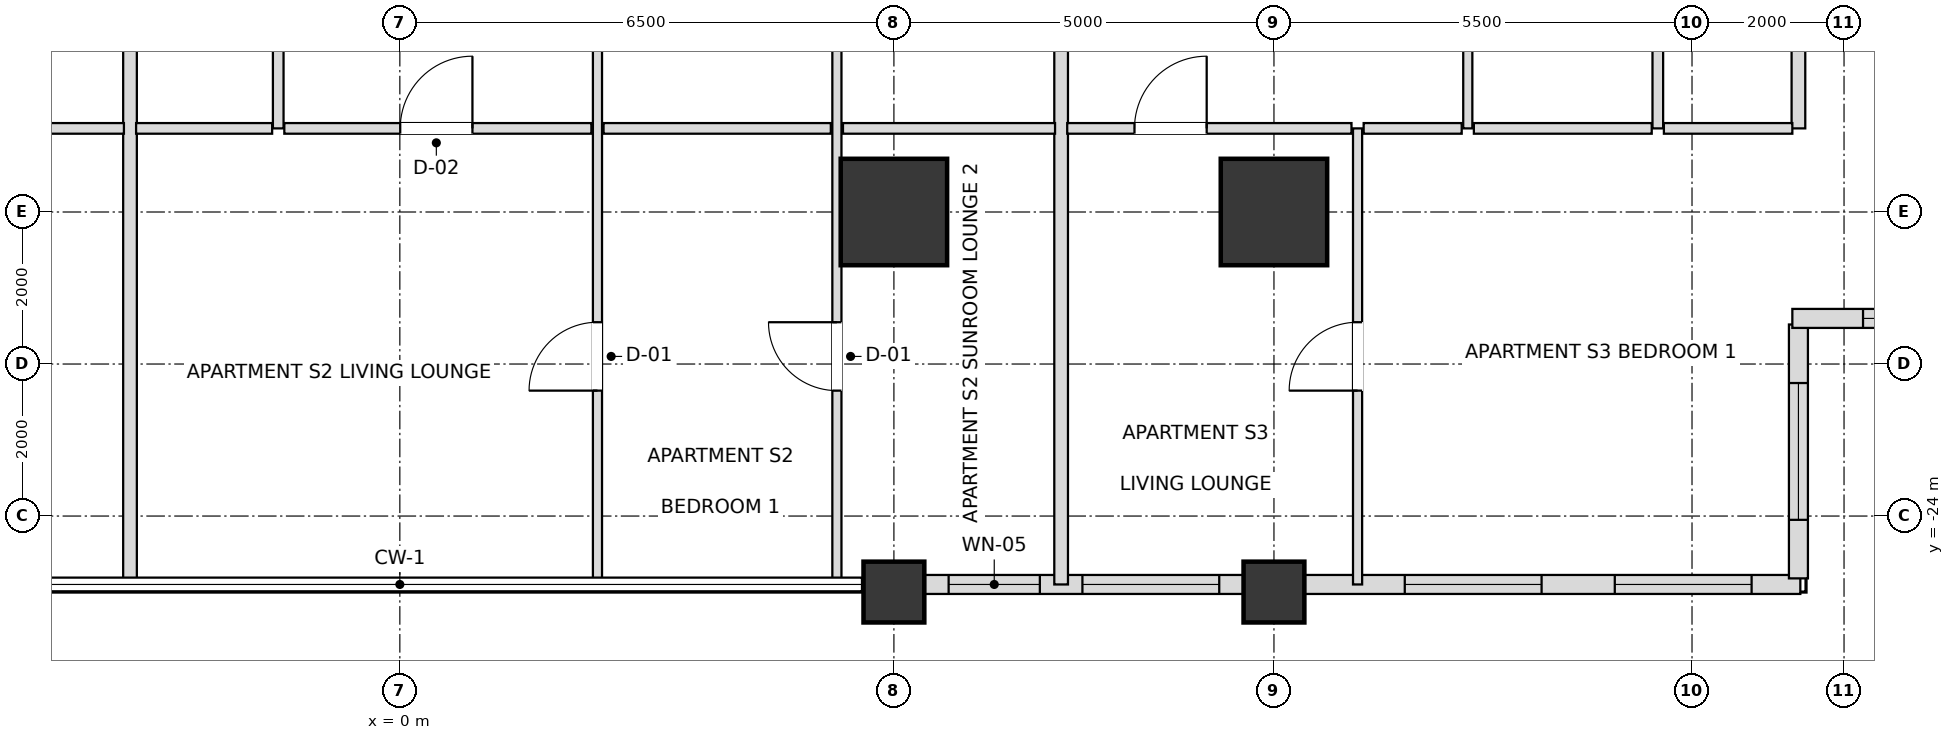
"""IFC4 building model, lengths in metres.
Left out: names, types, materials, properties, quantities, classifications, styles, units other than length and angle.
Written with IfcOpenShell. Run it as: python <this file> out.ifc"""

import sys

from ifc_helpers import new_model, si_unit, direction, frame, frame_2d, origin, origin_2d, place, context, subcontext, project, spatial, rectangle, extrude, element, fill, save


model = new_model("IFC4")
c1 = context("Model", 3, precision=1e-05, world=origin(), true_north=direction((0.0, 1.0)))
c2 = subcontext(c1, "Body", "Model", "MODEL_VIEW")
j1 = project(units=[si_unit("LENGTHUNIT", "METRE"), si_unit("PLANEANGLEUNIT", "RADIAN")], contexts=[c1])
p1 = place(None, origin())
s1 = spatial("IfcSite", under=j1, at=p1, CompositionType="ELEMENT")
p2 = place(p1, origin())
s2 = spatial("IfcBuilding", under=s1, at=p2, CompositionType="ELEMENT")
p3 = place(p2, frame((0.0, 0.0, 46.8)))
s3 = spatial("IfcBuildingStorey", under=s2, at=p3, CompositionType="ELEMENT", Elevation=46.8)
for number, where, z_axis, x_axis in (
    (1, (6.5, -20.0, 0.0), (0.0, 0.0, 1.0), (1.0, 0.0, 0.0)),
    (2, (11.5, -20.0, 0.0), (0.0, 0.0, 1.0), (1.0, 0.0, 0.0)),
):
    element("IfcColumn", number, at=place(p3, frame(where, z_axis=z_axis, x_axis=x_axis)), inside=s3, PredefinedType="USERDEFINED", context=c2, shape_type="SweptSolid", body=[
        extrude(rectangle(XDim=1.4, YDim=1.4, at=origin_2d()), origin(), (0.0, 0.0, 1.0), 3.6),
    ])
for number, where, z_axis, x_axis in (
    (3, (6.5, -25.0, 0.0), (0.0, 0.0, 1.0), (1.0, 0.0, 0.0)),
    (4, (11.5, -25.0, 0.0), (0.0, 0.0, 1.0), (1.0, 0.0, 0.0)),
):
    element("IfcColumn", number, at=place(p3, frame(where, z_axis=z_axis, x_axis=x_axis)), inside=s3, PredefinedType="COLUMN", context=c2, shape_type="SweptSolid", body=[
        extrude(rectangle(XDim=0.8, YDim=0.8, at=origin_2d()), origin(), (0.0, 0.0, 1.0), 3.6),
    ])
p4 = place(p3, frame((6.895, -24.9, 0.0), z_axis=(0.0, 0.0, 1.0), x_axis=(1.0, 0.0, 0.0)))
e5 = element("IfcWall", 5, at=p4, inside=s3, PredefinedType="SOLIDWALL", context=c2, shape_type="SweptSolid", body=[
    extrude(rectangle(XDim=4.21, YDim=0.25, at=frame_2d((2.105, 0.0))), origin(), (0.0, 0.0, 1.0), 2.736),
])
p5 = place(p4, frame((0.325, 0.0, 0.72)))
e6 = element("IfcOpeningElement", 6, at=p5, cuts=e5, PredefinedType="OPENING", context=c2, shape_type="SweptSolid", body=[
    extrude(rectangle(XDim=1.2, YDim=1.68, at=frame_2d((0.6, 0.84))), frame((0.0, 0.135, 0.0), z_axis=(0.0, -1.0, 0.0), x_axis=(1.0, 0.0, 0.0)), (0.0, 0.0, 1.0), 0.27),
])
p6 = place(p4, frame((2.085, 0.0, 0.72)))
e7 = element("IfcOpeningElement", 7, at=p6, cuts=e5, PredefinedType="OPENING", context=c2, shape_type="SweptSolid", body=[
    extrude(rectangle(XDim=1.8, YDim=1.68, at=frame_2d((0.9, 0.84))), frame((0.0, 0.135, 0.0), z_axis=(0.0, -1.0, 0.0), x_axis=(1.0, 0.0, 0.0)), (0.0, 0.0, 1.0), 0.27),
])
p7 = place(p3, frame((11.895, -24.9, 0.0), z_axis=(0.0, 0.0, 1.0), x_axis=(1.0, 0.0, 0.0)))
e8 = element("IfcWall", 8, at=p7, inside=s3, PredefinedType="SOLIDWALL", context=c2, shape_type="SweptSolid", body=[
    extrude(rectangle(XDim=6.53, YDim=0.25, at=frame_2d((3.265, 0.0))), origin(), (0.0, 0.0, 1.0), 2.736),
])
p8 = place(p7, frame((1.326, 0.0, 0.72)))
e9 = element("IfcOpeningElement", 9, at=p8, cuts=e8, PredefinedType="OPENING", context=c2, shape_type="SweptSolid", body=[
    extrude(rectangle(XDim=1.8, YDim=1.68, at=frame_2d((0.9, 0.84))), frame((0.0, 0.135, 0.0), z_axis=(0.0, -1.0, 0.0), x_axis=(1.0, 0.0, 0.0)), (0.0, 0.0, 1.0), 0.27),
])
p9 = place(p7, frame((4.089, 0.0, 0.72)))
e10 = element("IfcOpeningElement", 10, at=p9, cuts=e8, PredefinedType="OPENING", context=c2, shape_type="SweptSolid", body=[
    extrude(rectangle(XDim=1.8, YDim=1.68, at=frame_2d((0.9, 0.84))), frame((0.0, 0.135, 0.0), z_axis=(0.0, -1.0, 0.0), x_axis=(1.0, 0.0, 0.0)), (0.0, 0.0, 1.0), 0.27),
])
p10 = place(p3, frame((18.4, -24.82, 0.0), z_axis=(0.0, 0.0, 1.0), x_axis=(0.0, 1.0, 0.0)))
e11 = element("IfcWall", 11, at=p10, inside=s3, PredefinedType="SOLIDWALL", context=c2, shape_type="SweptSolid", body=[
    extrude(rectangle(XDim=3.34, YDim=0.25, at=frame_2d((1.67, 0.0))), origin(), (0.0, 0.0, 1.0), 2.736),
])
p11 = place(p10, frame((0.77, 0.0, 0.72)))
e12 = element("IfcOpeningElement", 12, at=p11, cuts=e11, PredefinedType="OPENING", context=c2, shape_type="SweptSolid", body=[
    extrude(rectangle(XDim=1.8, YDim=1.68, at=frame_2d((0.9, 0.84))), frame((0.0, 0.135, 0.0), z_axis=(0.0, -1.0, 0.0), x_axis=(1.0, 0.0, 0.0)), (0.0, 0.0, 1.0), 0.27),
])
p12 = place(p3, frame((18.32, -21.4, 0.0), z_axis=(0.0, 0.0, 1.0), x_axis=(1.0, 0.0, 0.0)))
e13 = element("IfcWall", 13, at=p12, inside=s3, PredefinedType="SOLIDWALL", context=c2, shape_type="SweptSolid", body=[
    extrude(rectangle(XDim=3.66, YDim=0.25, at=frame_2d((1.83, 0.0))), origin(), (0.0, 0.0, 1.0), 2.736),
])
p13 = place(p12, frame((0.93, 0.0, 0.72)))
e14 = element("IfcOpeningElement", 14, at=p13, cuts=e13, PredefinedType="OPENING", context=c2, shape_type="SweptSolid", body=[
    extrude(rectangle(XDim=1.8, YDim=1.68, at=frame_2d((0.9, 0.84))), frame((0.0, 0.135, 0.0), z_axis=(0.0, -1.0, 0.0), x_axis=(1.0, 0.0, 0.0)), (0.0, 0.0, 1.0), 0.27),
])
p14 = place(p3, frame((-3.55, -24.9, 0.0), z_axis=(0.0, 0.0, 1.0), x_axis=(0.0, 1.0, 0.0)))
e15 = element("IfcWall", 15, at=p14, inside=s3, PredefinedType="PARTITIONING", context=c2, shape_type="SweptSolid", body=[
    extrude(rectangle(XDim=15.6, YDim=0.18, at=frame_2d((7.8, 0.0))), origin(), (0.0, 0.0, 1.0), 2.816),
])
p15 = place(p3, frame((-1.6, -18.9, 0.0), z_axis=(0.0, 0.0, 1.0), x_axis=(0.0, 1.0, 0.0)))
e16 = element("IfcWall", 16, at=p15, inside=s3, PredefinedType="PARTITIONING", context=c2, shape_type="SweptSolid", body=[
    extrude(rectangle(XDim=9.6, YDim=0.14, at=frame_2d((4.8, 0.0))), origin(), (0.0, 0.0, 1.0), 2.948),
])
p16 = place(p15, frame((4.35, 0.0, 0.0)))
e17 = element("IfcOpeningElement", 17, at=p16, cuts=e16, PredefinedType="OPENING", context=c2, shape_type="SweptSolid", body=[
    extrude(rectangle(XDim=0.9, YDim=2.1, at=frame_2d((0.45, 1.05))), frame((0.0, 0.08, 0.0), z_axis=(0.0, -1.0, 0.0), x_axis=(1.0, 0.0, 0.0)), (0.0, 0.0, 1.0), 0.16),
])
p17 = place(p3, frame((2.6, -24.9, 0.0), z_axis=(0.0, 0.0, 1.0), x_axis=(0.0, 1.0, 0.0)))
e18 = element("IfcWall", 18, at=p17, inside=s3, PredefinedType="PARTITIONING", context=c2, shape_type="SweptSolid", body=[
    extrude(rectangle(XDim=15.6, YDim=0.12, at=frame_2d((7.8, 0.0))), origin(), (0.0, 0.0, 1.0), 2.816),
])
p18 = place(p17, frame((10.325, 0.0, 0.0)))
e19 = element("IfcOpeningElement", 19, at=p18, cuts=e18, PredefinedType="OPENING", context=c2, shape_type="SweptSolid", body=[
    extrude(rectangle(XDim=0.95, YDim=2.1, at=frame_2d((0.475, 1.05))), frame((0.0, 0.07, 0.0), z_axis=(0.0, -1.0, 0.0), x_axis=(1.0, 0.0, 0.0)), (0.0, 0.0, 1.0), 0.14),
])
p19 = place(p17, frame((2.55, 0.0, 0.0)))
e20 = element("IfcOpeningElement", 20, at=p19, cuts=e18, PredefinedType="OPENING", context=c2, shape_type="SweptSolid", body=[
    extrude(rectangle(XDim=0.9, YDim=2.1, at=frame_2d((0.45, 1.05))), frame((0.0, 0.07, 0.0), z_axis=(0.0, -1.0, 0.0), x_axis=(1.0, 0.0, 0.0)), (0.0, 0.0, 1.0), 0.14),
])
p20 = place(p3, frame((5.75, -24.9, 0.0), z_axis=(0.0, 0.0, 1.0), x_axis=(0.0, 1.0, 0.0)))
e21 = element("IfcWall", 21, at=p20, inside=s3, PredefinedType="PARTITIONING", context=c2, shape_type="SweptSolid", body=[
    extrude(rectangle(XDim=15.6, YDim=0.12, at=frame_2d((7.8, 0.0))), origin(), (0.0, 0.0, 1.0), 2.816),
])
p21 = place(p20, frame((10.35, 0.0, 0.0)))
e22 = element("IfcOpeningElement", 22, at=p21, cuts=e21, PredefinedType="OPENING", context=c2, shape_type="SweptSolid", body=[
    extrude(rectangle(XDim=0.9, YDim=2.1, at=frame_2d((0.45, 1.05))), frame((0.0, 0.07, 0.0), z_axis=(0.0, -1.0, 0.0), x_axis=(1.0, 0.0, 0.0)), (0.0, 0.0, 1.0), 0.14),
])
p22 = place(p20, frame((2.55, 0.0, 0.0)))
e23 = element("IfcOpeningElement", 23, at=p22, cuts=e21, PredefinedType="OPENING", context=c2, shape_type="SweptSolid", body=[
    extrude(rectangle(XDim=0.9, YDim=2.1, at=frame_2d((0.45, 1.05))), frame((0.0, 0.07, 0.0), z_axis=(0.0, -1.0, 0.0), x_axis=(1.0, 0.0, 0.0)), (0.0, 0.0, 1.0), 0.14),
])
p23 = place(p3, frame((8.7, -24.9, 0.0), z_axis=(0.0, 0.0, 1.0), x_axis=(0.0, 1.0, 0.0)))
e24 = element("IfcWall", 24, at=p23, inside=s3, PredefinedType="PARTITIONING", context=c2, shape_type="SweptSolid", body=[
    extrude(rectangle(XDim=15.6, YDim=0.18, at=frame_2d((7.8, 0.0))), origin(), (0.0, 0.0, 1.0), 2.816),
])
p24 = place(p3, frame((12.6, -24.9, 0.0), z_axis=(0.0, 0.0, 1.0), x_axis=(0.0, 1.0, 0.0)))
e25 = element("IfcWall", 25, at=p24, inside=s3, PredefinedType="PARTITIONING", context=c2, shape_type="SweptSolid", body=[
    extrude(rectangle(XDim=6.0, YDim=0.12, at=frame_2d((3.0, 0.0))), origin(), (0.0, 0.0, 1.0), 2.736),
])
p25 = place(p24, frame((2.55, 0.0, 0.0)))
e26 = element("IfcOpeningElement", 26, at=p25, cuts=e25, PredefinedType="OPENING", context=c2, shape_type="SweptSolid", body=[
    extrude(rectangle(XDim=0.9, YDim=2.1, at=frame_2d((0.45, 1.05))), frame((0.0, 0.07, 0.0), z_axis=(0.0, -1.0, 0.0), x_axis=(1.0, 0.0, 0.0)), (0.0, 0.0, 1.0), 0.14),
])
p26 = place(p3, frame((14.05, -18.9, 0.0), z_axis=(0.0, 0.0, 1.0), x_axis=(0.0, 1.0, 0.0)))
e27 = element("IfcWall", 27, at=p26, inside=s3, PredefinedType="PARTITIONING", context=c2, shape_type="SweptSolid", body=[
    extrude(rectangle(XDim=9.6, YDim=0.12, at=frame_2d((4.8, 0.0))), origin(), (0.0, 0.0, 1.0), 2.736),
])
p27 = place(p26, frame((4.325, 0.0, 0.0)))
e28 = element("IfcOpeningElement", 28, at=p27, cuts=e27, PredefinedType="OPENING", context=c2, shape_type="SweptSolid", body=[
    extrude(rectangle(XDim=0.95, YDim=2.1, at=frame_2d((0.475, 1.05))), frame((0.0, 0.07, 0.0), z_axis=(0.0, -1.0, 0.0), x_axis=(1.0, 0.0, 0.0)), (0.0, 0.0, 1.0), 0.14),
])
p28 = place(p3, frame((16.55, -18.9, 0.0), z_axis=(0.0, 0.0, 1.0), x_axis=(0.0, 1.0, 0.0)))
e29 = element("IfcWall", 29, at=p28, inside=s3, PredefinedType="PARTITIONING", context=c2, shape_type="SweptSolid", body=[
    extrude(rectangle(XDim=9.6, YDim=0.14, at=frame_2d((4.8, 0.0))), origin(), (0.0, 0.0, 1.0), 2.736),
])
p29 = place(p28, frame((4.222, 0.0, 0.0)))
e30 = element("IfcOpeningElement", 30, at=p29, cuts=e29, PredefinedType="OPENING", context=c2, shape_type="SweptSolid", body=[
    extrude(rectangle(XDim=0.9, YDim=2.1, at=frame_2d((0.45, 1.05))), frame((0.0, 0.08, 0.0), z_axis=(0.0, -1.0, 0.0), x_axis=(1.0, 0.0, 0.0)), (0.0, 0.0, 1.0), 0.16),
])
p30 = place(p3, frame((18.4, -18.9, 0.0), z_axis=(0.0, 0.0, 1.0), x_axis=(0.0, 1.0, 0.0)))
e31 = element("IfcWall", 31, at=p30, inside=s3, PredefinedType="PARTITIONING", context=c2, shape_type="SweptSolid", body=[
    extrude(rectangle(XDim=9.6, YDim=0.18, at=frame_2d((4.8, 0.0))), origin(), (0.0, 0.0, 1.0), 2.736),
])
p31 = place(p3, frame((-7.67, -18.9, 0.0), z_axis=(0.0, 0.0, 1.0), x_axis=(1.0, 0.0, 0.0)))
e32 = element("IfcWall", 32, at=p31, inside=s3, PredefinedType="PARTITIONING", context=c2, shape_type="SweptSolid", body=[
    extrude(rectangle(XDim=4.04, YDim=0.14, at=frame_2d((2.02, 0.0))), origin(), (0.0, 0.0, 1.0), 2.816),
])
p32 = place(p31, frame((1.934, 0.0, 0.0)))
e33 = element("IfcOpeningElement", 33, at=p32, cuts=e32, PredefinedType="OPENING", context=c2, shape_type="SweptSolid", body=[
    extrude(rectangle(XDim=0.95, YDim=2.1, at=frame_2d((0.475, 1.05))), frame((0.0, 0.08, 0.0), z_axis=(0.0, -1.0, 0.0), x_axis=(1.0, 0.0, 0.0)), (0.0, 0.0, 1.0), 0.16),
])
p33 = place(p3, frame((-3.47, -18.9, 0.0), z_axis=(0.0, 0.0, 1.0), x_axis=(1.0, 0.0, 0.0)))
e34 = element("IfcWall", 34, at=p33, inside=s3, PredefinedType="PARTITIONING", context=c2, shape_type="SweptSolid", body=[
    extrude(rectangle(XDim=1.79, YDim=0.14, at=frame_2d((0.895, 0.0))), origin(), (0.0, 0.0, 1.0), 3.38),
])
p34 = place(p3, frame((-1.52, -18.9, 0.0), z_axis=(0.0, 0.0, 1.0), x_axis=(1.0, 0.0, 0.0)))
e35 = element("IfcWall", 35, at=p34, inside=s3, PredefinedType="PARTITIONING", context=c2, shape_type="SweptSolid", body=[
    extrude(rectangle(XDim=4.04, YDim=0.14, at=frame_2d((2.02, 0.0))), origin(), (0.0, 0.0, 1.0), 3.38),
])
p35 = place(p34, frame((1.525, 0.0, 0.0)))
e36 = element("IfcOpeningElement", 36, at=p35, cuts=e35, PredefinedType="OPENING", context=c2, shape_type="SweptSolid", body=[
    extrude(rectangle(XDim=0.95, YDim=2.1, at=frame_2d((0.475, 1.05))), frame((0.0, 0.08, 0.0), z_axis=(0.0, -1.0, 0.0), x_axis=(1.0, 0.0, 0.0)), (0.0, 0.0, 1.0), 0.16),
])
p36 = place(p3, frame((2.68, -18.9, 0.0), z_axis=(0.0, 0.0, 1.0), x_axis=(1.0, 0.0, 0.0)))
e37 = element("IfcWall", 37, at=p36, inside=s3, PredefinedType="PARTITIONING", context=c2, shape_type="SweptSolid", body=[
    extrude(rectangle(XDim=2.99, YDim=0.14, at=frame_2d((1.495, 0.0))), origin(), (0.0, 0.0, 1.0), 3.38),
])
p37 = place(p3, frame((5.83, -18.9, 0.0), z_axis=(0.0, 0.0, 1.0), x_axis=(1.0, 0.0, 0.0)))
e38 = element("IfcWall", 38, at=p37, inside=s3, PredefinedType="PARTITIONING", context=c2, shape_type="SweptSolid", body=[
    extrude(rectangle(XDim=2.79, YDim=0.14, at=frame_2d((1.395, 0.0))), origin(), (0.0, 0.0, 1.0), 2.816),
])
p38 = place(p3, frame((8.78, -18.9, 0.0), z_axis=(0.0, 0.0, 1.0), x_axis=(1.0, 0.0, 0.0)))
e39 = element("IfcWall", 39, at=p38, inside=s3, PredefinedType="PARTITIONING", context=c2, shape_type="SweptSolid", body=[
    extrude(rectangle(XDim=3.74, YDim=0.14, at=frame_2d((1.87, 0.0))), origin(), (0.0, 0.0, 1.0), 2.736),
])
p39 = place(p38, frame((0.885, 0.0, 0.0)))
e40 = element("IfcOpeningElement", 40, at=p39, cuts=e39, PredefinedType="OPENING", context=c2, shape_type="SweptSolid", body=[
    extrude(rectangle(XDim=0.95, YDim=2.1, at=frame_2d((0.475, 1.05))), frame((0.0, 0.08, 0.0), z_axis=(0.0, -1.0, 0.0), x_axis=(1.0, 0.0, 0.0)), (0.0, 0.0, 1.0), 0.16),
])
p40 = place(p3, frame((12.68, -18.9, 0.0), z_axis=(0.0, 0.0, 1.0), x_axis=(1.0, 0.0, 0.0)))
e41 = element("IfcWall", 41, at=p40, inside=s3, PredefinedType="PARTITIONING", context=c2, shape_type="SweptSolid", body=[
    extrude(rectangle(XDim=1.29, YDim=0.14, at=frame_2d((0.645, 0.0))), origin(), (0.0, 0.0, 1.0), 2.736),
])
p41 = place(p3, frame((14.13, -18.9, 0.0), z_axis=(0.0, 0.0, 1.0), x_axis=(1.0, 0.0, 0.0)))
e42 = element("IfcWall", 42, at=p41, inside=s3, PredefinedType="PARTITIONING", context=c2, shape_type="SweptSolid", body=[
    extrude(rectangle(XDim=2.34, YDim=0.14, at=frame_2d((1.17, 0.0))), origin(), (0.0, 0.0, 1.0), 2.736),
])
p42 = place(p3, frame((16.63, -18.9, 0.0), z_axis=(0.0, 0.0, 1.0), x_axis=(1.0, 0.0, 0.0)))
e43 = element("IfcWall", 43, at=p42, inside=s3, PredefinedType="PARTITIONING", context=c2, shape_type="SweptSolid", body=[
    extrude(rectangle(XDim=1.69, YDim=0.14, at=frame_2d((0.845, 0.0))), origin(), (0.0, 0.0, 1.0), 2.736),
])
p43 = place(p5, origin())
e44 = element("IfcWindow", 44, at=p43, inside=s3, PartitioningType="SINGLE_PANEL", PredefinedType="WINDOW", context=c2, shape_type="SweptSolid", body=[
    extrude(rectangle(XDim=1.2, YDim=1.68, at=frame_2d((0.6, 0.84))), frame((0.0, 0.03, 0.0), z_axis=(0.0, -1.0, 0.0), x_axis=(1.0, 0.0, 0.0)), (0.0, 0.0, 1.0), 0.06),
])
fill(e6, e44)
p44 = place(p6, origin())
e45 = element("IfcWindow", 45, at=p44, inside=s3, PartitioningType="SINGLE_PANEL", PredefinedType="WINDOW", context=c2, shape_type="SweptSolid", body=[
    extrude(rectangle(XDim=1.8, YDim=1.68, at=frame_2d((0.9, 0.84))), frame((0.0, 0.03, 0.0), z_axis=(0.0, -1.0, 0.0), x_axis=(1.0, 0.0, 0.0)), (0.0, 0.0, 1.0), 0.06),
])
fill(e7, e45)
p45 = place(p8, origin())
e46 = element("IfcWindow", 46, at=p45, inside=s3, PartitioningType="SINGLE_PANEL", PredefinedType="WINDOW", context=c2, shape_type="SweptSolid", body=[
    extrude(rectangle(XDim=1.8, YDim=1.68, at=frame_2d((0.9, 0.84))), frame((0.0, 0.03, 0.0), z_axis=(0.0, -1.0, 0.0), x_axis=(1.0, 0.0, 0.0)), (0.0, 0.0, 1.0), 0.06),
])
fill(e9, e46)
p46 = place(p9, origin())
e47 = element("IfcWindow", 47, at=p46, inside=s3, PartitioningType="SINGLE_PANEL", PredefinedType="WINDOW", context=c2, shape_type="SweptSolid", body=[
    extrude(rectangle(XDim=1.8, YDim=1.68, at=frame_2d((0.9, 0.84))), frame((0.0, 0.03, 0.0), z_axis=(0.0, -1.0, 0.0), x_axis=(1.0, 0.0, 0.0)), (0.0, 0.0, 1.0), 0.06),
])
fill(e10, e47)
p47 = place(p11, origin())
e48 = element("IfcWindow", 48, at=p47, inside=s3, PartitioningType="SINGLE_PANEL", PredefinedType="WINDOW", context=c2, shape_type="SweptSolid", body=[
    extrude(rectangle(XDim=1.8, YDim=1.68, at=frame_2d((0.9, 0.84))), frame((0.0, 0.03, 0.0), z_axis=(0.0, -1.0, 0.0), x_axis=(1.0, 0.0, 0.0)), (0.0, 0.0, 1.0), 0.06),
])
fill(e12, e48)
p48 = place(p13, origin())
e49 = element("IfcWindow", 49, at=p48, inside=s3, PartitioningType="SINGLE_PANEL", PredefinedType="WINDOW", context=c2, shape_type="SweptSolid", body=[
    extrude(rectangle(XDim=1.8, YDim=1.68, at=frame_2d((0.9, 0.84))), frame((0.0, 0.03, 0.0), z_axis=(0.0, -1.0, 0.0), x_axis=(1.0, 0.0, 0.0)), (0.0, 0.0, 1.0), 0.06),
])
fill(e14, e49)
p49 = place(p35, origin())
e50 = element("IfcDoor", 50, at=p49, inside=s3, OperationType="SINGLE_SWING_RIGHT", PredefinedType="DOOR", context=c2, shape_type="SweptSolid", body=[
    extrude(rectangle(XDim=0.95, YDim=2.1, at=frame_2d((0.475, 1.05))), frame((0.0, 0.025, 0.0), z_axis=(0.0, -1.0, 0.0), x_axis=(1.0, 0.0, 0.0)), (0.0, 0.0, 1.0), 0.05),
])
fill(e36, e50)
p50 = place(p19, origin())
e51 = element("IfcDoor", 51, at=p50, inside=s3, OperationType="SINGLE_SWING_LEFT", PredefinedType="DOOR", context=c2, shape_type="SweptSolid", body=[
    extrude(rectangle(XDim=0.9, YDim=2.1, at=frame_2d((0.45, 1.05))), frame((0.0, 0.025, 0.0), z_axis=(0.0, -1.0, 0.0), x_axis=(1.0, 0.0, 0.0)), (0.0, 0.0, 1.0), 0.05),
])
fill(e20, e51)
p51 = place(p22, origin())
e52 = element("IfcDoor", 52, at=p51, inside=s3, OperationType="SINGLE_SWING_RIGHT", PredefinedType="DOOR", context=c2, shape_type="SweptSolid", body=[
    extrude(rectangle(XDim=0.9, YDim=2.1, at=frame_2d((0.45, 1.05))), frame((0.0, 0.025, 0.0), z_axis=(0.0, -1.0, 0.0), x_axis=(1.0, 0.0, 0.0)), (0.0, 0.0, 1.0), 0.05),
])
fill(e23, e52)
p52 = place(p39, origin())
e53 = element("IfcDoor", 53, at=p52, inside=s3, OperationType="SINGLE_SWING_RIGHT", PredefinedType="DOOR", context=c2, shape_type="SweptSolid", body=[
    extrude(rectangle(XDim=0.95, YDim=2.1, at=frame_2d((0.475, 1.05))), frame((0.0, 0.025, 0.0), z_axis=(0.0, -1.0, 0.0), x_axis=(1.0, 0.0, 0.0)), (0.0, 0.0, 1.0), 0.05),
])
fill(e40, e53)
p53 = place(p25, origin())
e54 = element("IfcDoor", 54, at=p53, inside=s3, OperationType="SINGLE_SWING_LEFT", PredefinedType="DOOR", context=c2, shape_type="SweptSolid", body=[
    extrude(rectangle(XDim=0.9, YDim=2.1, at=frame_2d((0.45, 1.05))), frame((0.0, 0.025, 0.0), z_axis=(0.0, -1.0, 0.0), x_axis=(1.0, 0.0, 0.0)), (0.0, 0.0, 1.0), 0.05),
])
fill(e26, e54)
save(model, sys.argv[1])
